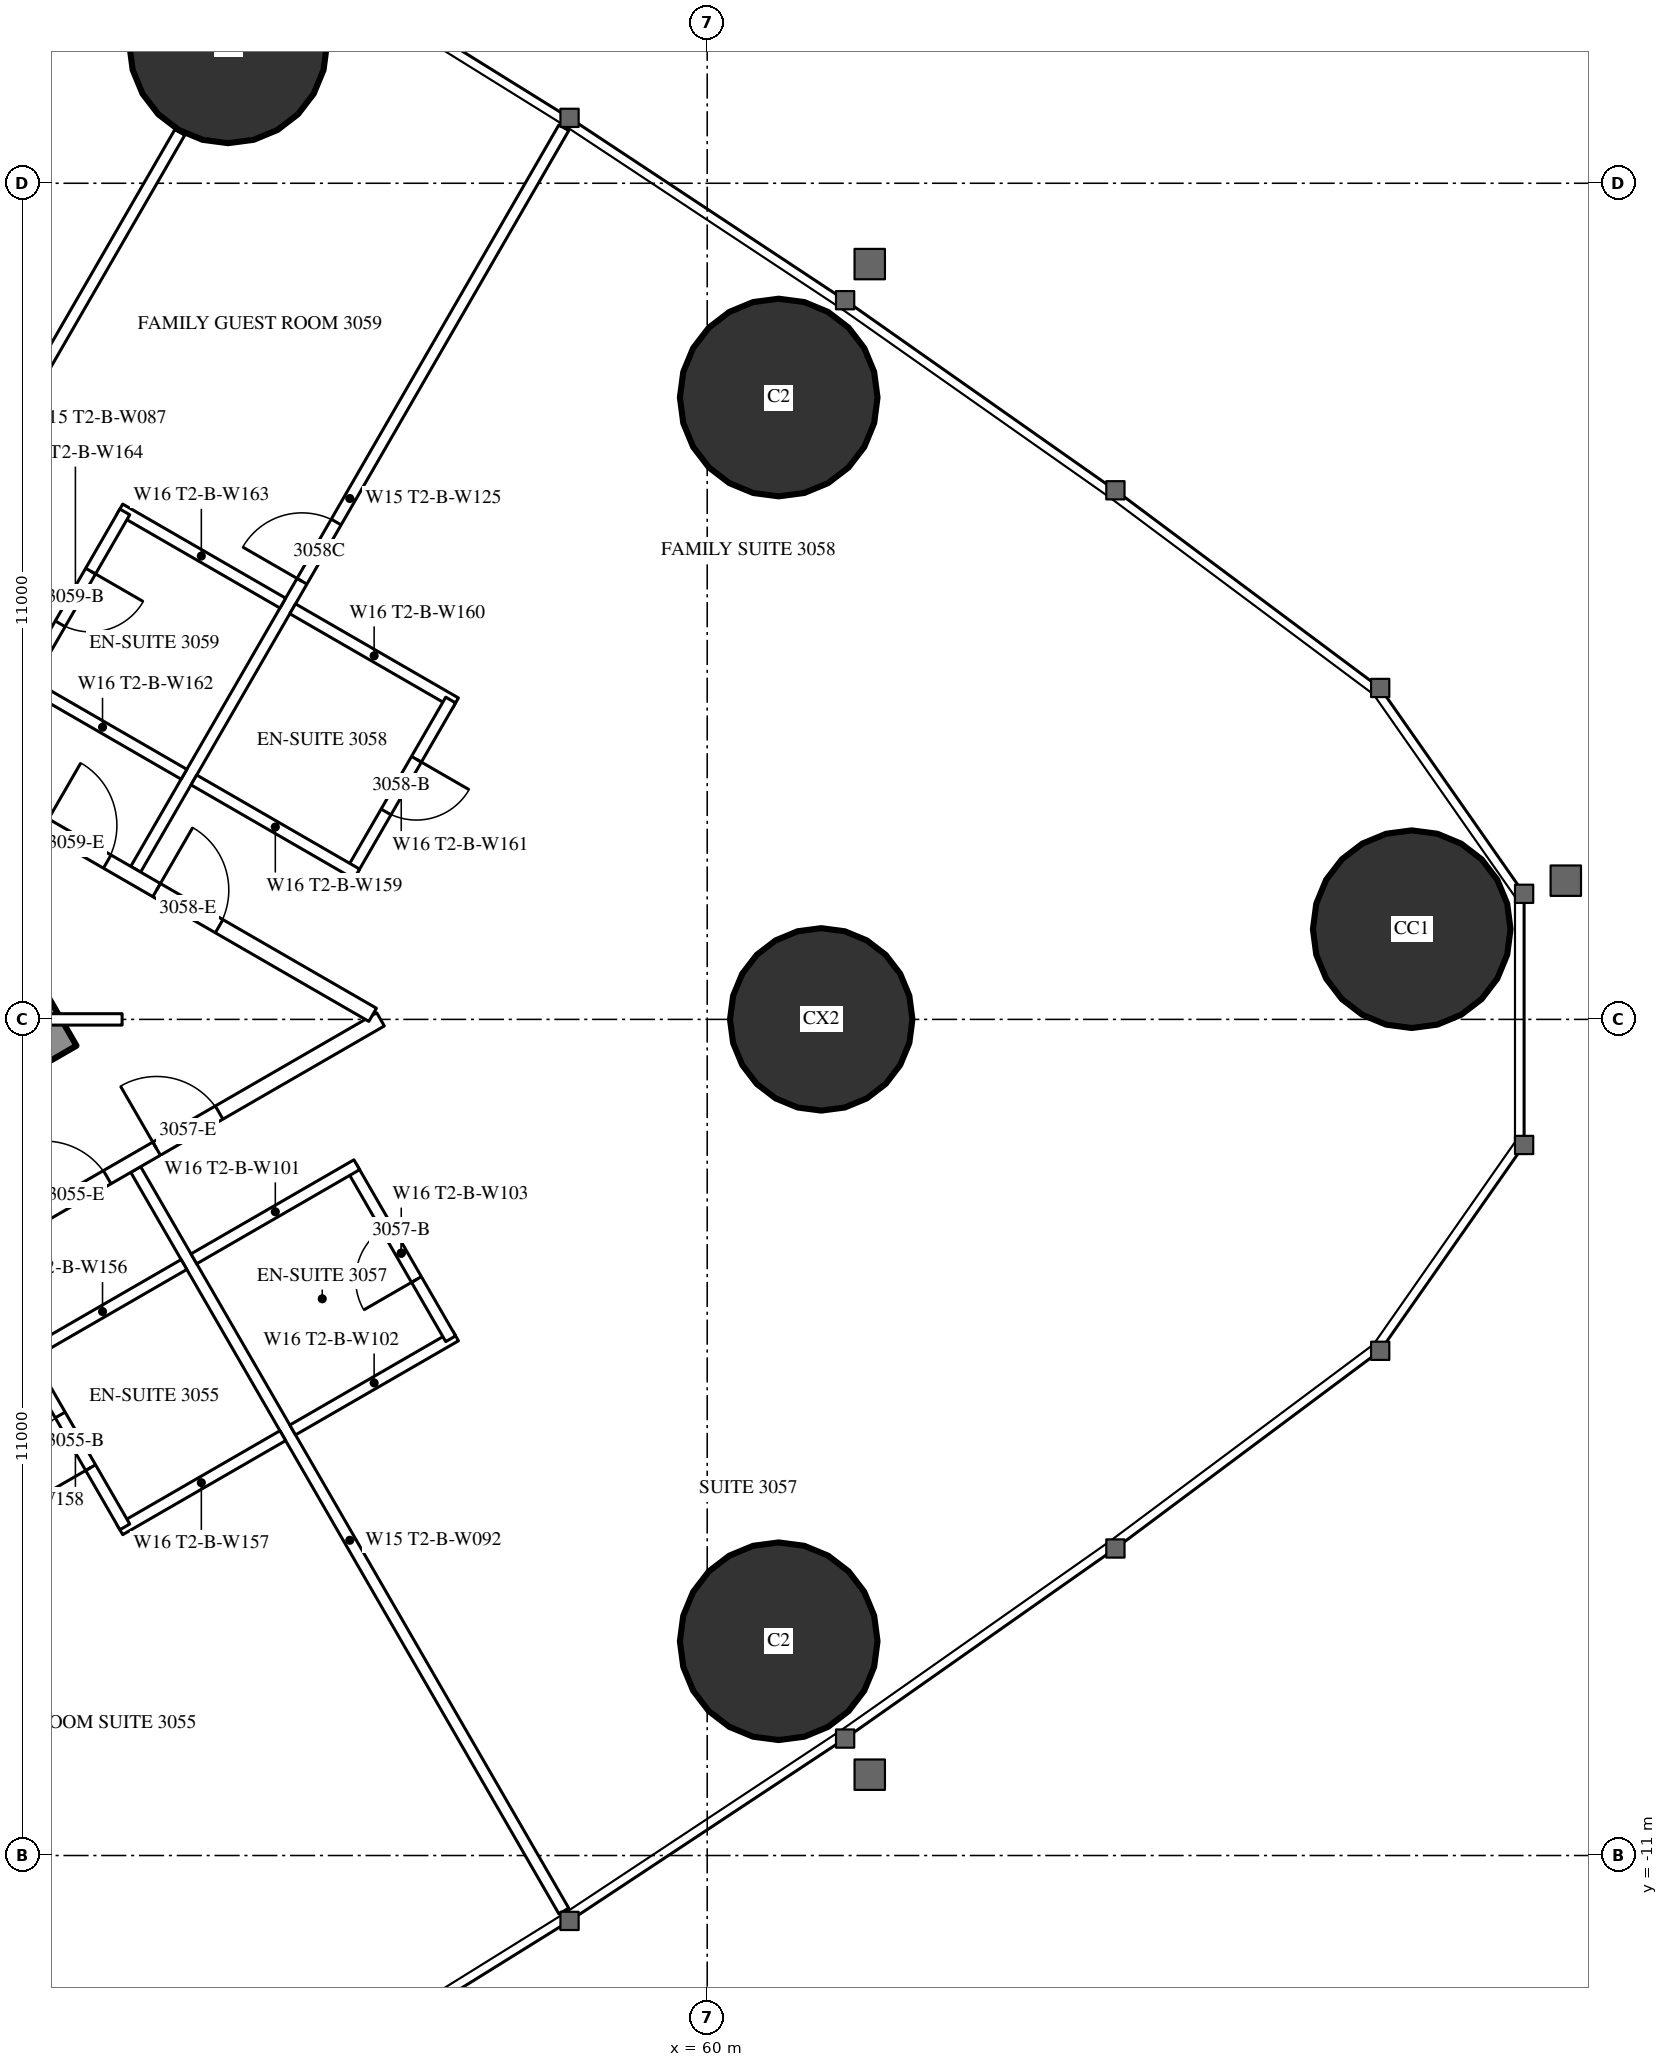
"""IFC4 building model, lengths in metres.
Left out: names, types, materials, properties, quantities, classifications, styles, units other than length and angle.
Written with IfcOpenShell. Run it as: python <this file> out.ifc"""

import sys

from ifc_helpers import new_model, si_unit, direction, frame, frame_2d, origin, origin_2d, place, context, subcontext, project, spatial, rectangle, circle, hollow_circle, extrude, element, fill, save


model = new_model("IFC4")
c1 = context("Model", 3, precision=1e-05, world=origin(), true_north=direction((0.0, 1.0)))
c2 = subcontext(c1, "Body", "Model", "MODEL_VIEW")
j1 = project(units=[si_unit("LENGTHUNIT", "METRE"), si_unit("PLANEANGLEUNIT", "RADIAN")], contexts=[c1])
p1 = place(None, origin())
s1 = spatial("IfcSite", under=j1, at=p1, CompositionType="ELEMENT")
p2 = place(p1, origin())
s2 = spatial("IfcBuilding", under=s1, at=p2, CompositionType="ELEMENT")
p3 = place(p2, frame((0.0, 0.0, 115.1)))
s3 = spatial("IfcBuildingStorey", under=s2, at=p3, CompositionType="ELEMENT", Elevation=115.1)
for number, where, z_axis, x_axis in (
    (1, (69.269, 1.187, 0.0), (0.0, 0.0, 1.0), (1.0, 0.0, 0.0)),
    (2, (60.941, 8.181, 0.0), (0.0, 0.0, 1.0), (1.0, 0.0, 0.0)),
    (3, (53.697, 12.827, 0.0), (0.0, 0.0, 1.0), (1.0, 0.0, 0.0)),
    (4, (60.941, -8.181, 0.0), (0.0, 0.0, 1.0), (1.0, 0.0, 0.0)),
):
    element("IfcColumn", number, at=place(p3, frame(where, z_axis=z_axis, x_axis=x_axis)), inside=s3, PredefinedType="COLUMN", context=c2, shape_type="SweptSolid", body=[
        extrude(hollow_circle(Radius=1.3, WallThickness=0.1, at=origin_2d()), origin(), (0.0, 0.0, 1.0), 3.5),
    ])
p4 = place(p3, frame((61.5, 0.0, 0.0), z_axis=(0.0, 0.0, 1.0), x_axis=(1.0, 0.0, 0.0)))
e5 = element("IfcColumn", 5, at=p4, inside=s3, PredefinedType="COLUMN", context=c2, shape_type="SweptSolid", body=[
    extrude(circle(Radius=1.2, at=origin_2d()), origin(), (0.0, 0.0, 1.0), 3.5),
])
p5 = place(p3, frame((27.2, -13.8, 0.0), z_axis=(0.0, 0.0, 1.0), x_axis=(0.866027159892, 0.499996958321, 0.0)))
e6 = element("IfcWall", 6, at=p5, inside=s3, PredefinedType="SHEAR", context=c2, shape_type="SweptSolid", body=[
    extrude(rectangle(XDim=27.947, YDim=1.2, at=frame_2d((13.973, 0.0))), origin(), (0.0, 0.0, 1.0), 3.5),
])
p6 = place(p5, frame((4.6, 0.0, 0.0)))
e7 = element("IfcOpeningElement", 7, at=p6, cuts=e6, PredefinedType="OPENING", context=c2, shape_type="SweptSolid", body=[
    extrude(rectangle(XDim=1.0, YDim=2.2, at=frame_2d((0.5, 1.1))), frame((0.0, 0.61, 0.0), z_axis=(0.0, -1.0, 0.0), x_axis=(1.0, 0.0, 0.0)), (0.0, 0.0, 1.0), 1.22),
])
p7 = place(p5, frame((13.395, 0.0, 0.0)))
e8 = element("IfcOpeningElement", 8, at=p7, cuts=e6, PredefinedType="OPENING", context=c2, shape_type="SweptSolid", body=[
    extrude(rectangle(XDim=1.8, YDim=2.2, at=frame_2d((0.9, 1.1))), frame((0.0, 0.61, 0.0), z_axis=(0.0, -1.0, 0.0), x_axis=(1.0, 0.0, 0.0)), (0.0, 0.0, 1.0), 1.22),
])
p8 = place(p3, frame((52.481, -1.975, 0.0), z_axis=(0.0, 0.0, 1.0), x_axis=(0.500003867771, -0.866023170714, 0.0)))
e9 = element("IfcWall", 9, at=p8, inside=s3, PredefinedType="PARTITIONING", context=c2, shape_type="SweptSolid", body=[
    extrude(rectangle(XDim=11.265, YDim=0.15, at=frame_2d((5.632, 0.0))), origin(), (0.0, 0.0, 1.0), 3.25),
])
p9 = place(p3, frame((48.719, 4.147, 0.0), z_axis=(0.0, 0.0, 1.0), x_axis=(0.499993328235, 0.866029255696, 0.0)))
e10 = element("IfcWall", 10, at=p9, inside=s3, PredefinedType="PARTITIONING", context=c2, shape_type="SweptSolid", body=[
    extrude(rectangle(XDim=8.686, YDim=0.15, at=frame_2d((4.343, 0.0))), origin(), (0.0, 0.0, 1.0), 2.2),
])
p10 = place(p3, frame((52.481, 1.975, 0.0), z_axis=(0.0, 0.0, 1.0), x_axis=(0.500003867771, 0.866023170714, 0.0)))
e11 = element("IfcWall", 11, at=p10, inside=s3, PredefinedType="PARTITIONING", context=c2, shape_type="SweptSolid", body=[
    extrude(rectangle(XDim=11.265, YDim=0.15, at=frame_2d((5.632, 0.0))), origin(), (0.0, 0.0, 1.0), 3.25),
])
p11 = place(p10, frame((4.375, 0.0, 0.0)))
e12 = element("IfcOpeningElement", 12, at=p11, cuts=e11, PredefinedType="OPENING", context=c2, shape_type="SweptSolid", body=[
    extrude(rectangle(XDim=0.9, YDim=2.2, at=frame_2d((0.45, 1.1))), frame((0.0, 0.085, 0.0), z_axis=(0.0, -1.0, 0.0), x_axis=(1.0, 0.0, 0.0)), (0.0, 0.0, 1.0), 0.17),
])
p12 = place(p3, frame((37.96, -10.243, 0.0), z_axis=(0.0, 0.0, 1.0), x_axis=(0.866026429433, 0.499998223521, 0.0)))
e13 = element("IfcWall", 13, at=p12, inside=s3, PredefinedType="PARTITIONING", context=c2, shape_type="SweptSolid", body=[
    extrude(rectangle(XDim=20.487, YDim=0.2, at=frame_2d((10.243, 0.0))), origin(), (0.0, 0.0, 1.0), 3.25),
])
p13 = place(p12, frame((4.343, 0.0, 0.0)))
e14 = element("IfcOpeningElement", 14, at=p13, cuts=e13, PredefinedType="OPENING", context=c2, shape_type="SweptSolid", body=[
    extrude(rectangle(XDim=0.95, YDim=2.2, at=frame_2d((0.475, 1.1))), frame((0.0, 0.11, 0.0), z_axis=(0.0, -1.0, 0.0), x_axis=(1.0, 0.0, 0.0)), (0.0, 0.0, 1.0), 0.22),
])
p14 = place(p12, frame((15.385, 0.0, 0.0)))
e15 = element("IfcOpeningElement", 15, at=p14, cuts=e13, PredefinedType="OPENING", context=c2, shape_type="SweptSolid", body=[
    extrude(rectangle(XDim=0.95, YDim=2.2, at=frame_2d((0.475, 1.1))), frame((0.0, 0.11, 0.0), z_axis=(0.0, -1.0, 0.0), x_axis=(1.0, 0.0, 0.0)), (0.0, 0.0, 1.0), 0.22),
])
p15 = place(p12, frame((17.085, 0.0, 0.0)))
e16 = element("IfcOpeningElement", 16, at=p15, cuts=e13, PredefinedType="OPENING", context=c2, shape_type="SweptSolid", body=[
    extrude(rectangle(XDim=0.95, YDim=2.2, at=frame_2d((0.475, 1.1))), frame((0.0, 0.11, 0.0), z_axis=(0.0, -1.0, 0.0), x_axis=(1.0, 0.0, 0.0)), (0.0, 0.0, 1.0), 0.22),
])
p16 = place(p12, frame((1.048, 0.0, 0.0)))
e17 = element("IfcOpeningElement", 17, at=p16, cuts=e13, PredefinedType="OPENING", context=c2, shape_type="SweptSolid", body=[
    extrude(rectangle(XDim=1.8, YDim=2.2, at=frame_2d((0.9, 1.1))), frame((0.0, 0.11, 0.0), z_axis=(0.0, -1.0, 0.0), x_axis=(1.0, 0.0, 0.0)), (0.0, 0.0, 1.0), 0.22),
])
p17 = place(p3, frame((44.925, 6.222, 0.0), z_axis=(0.0, 0.0, 1.0), x_axis=(0.866025590081, -0.499999677325, 0.0)))
e18 = element("IfcWall", 18, at=p17, inside=s3, PredefinedType="PARTITIONING", context=c2, shape_type="SweptSolid", body=[
    extrude(rectangle(XDim=12.324, YDim=0.2, at=frame_2d((6.162, 0.0))), origin(), (0.0, 0.0, 1.0), 3.25),
])
p18 = place(p17, frame((9.042, 0.0, 0.0)))
e19 = element("IfcOpeningElement", 19, at=p18, cuts=e18, PredefinedType="OPENING", context=c2, shape_type="SweptSolid", body=[
    extrude(rectangle(XDim=0.95, YDim=2.2, at=frame_2d((0.475, 1.1))), frame((0.0, 0.11, 0.0), z_axis=(0.0, -1.0, 0.0), x_axis=(1.0, 0.0, 0.0)), (0.0, 0.0, 1.0), 0.22),
])
p19 = place(p17, frame((7.342, 0.0, 0.0)))
e20 = element("IfcOpeningElement", 20, at=p19, cuts=e18, PredefinedType="OPENING", context=c2, shape_type="SweptSolid", body=[
    extrude(rectangle(XDim=0.95, YDim=2.2, at=frame_2d((0.475, 1.1))), frame((0.0, 0.11, 0.0), z_axis=(0.0, -1.0, 0.0), x_axis=(1.0, 0.0, 0.0)), (0.0, 0.0, 1.0), 0.22),
])
p20 = place(p17, frame((0.6, 0.0, 0.0)))
e21 = element("IfcOpeningElement", 21, at=p20, cuts=e18, PredefinedType="OPENING", context=c2, shape_type="SweptSolid", body=[
    extrude(rectangle(XDim=0.95, YDim=2.2, at=frame_2d((0.475, 1.1))), frame((0.0, 0.11, 0.0), z_axis=(0.0, -1.0, 0.0), x_axis=(1.0, 0.0, 0.0)), (0.0, 0.0, 1.0), 0.22),
])
p21 = place(p3, frame((52.273, -6.714, 0.0), z_axis=(0.0, 0.0, 1.0), x_axis=(0.866031185235, 0.4999899861, 0.0)))
e22 = element("IfcWall", 22, at=p21, inside=s3, PredefinedType="PARTITIONING", context=c2, shape_type="SweptSolid", body=[
    extrude(rectangle(XDim=2.475, YDim=0.15, at=frame_2d((1.238, 0.0))), origin(), (0.0, 0.0, 1.0), 3.25),
])
p22 = place(p3, frame((51.038, -4.425, 0.0), z_axis=(0.0, 0.0, 1.0), x_axis=(0.49997716683, -0.86603858612, 0.0)))
e23 = element("IfcWall", 23, at=p22, inside=s3, PredefinedType="PARTITIONING", context=c2, shape_type="SweptSolid", body=[
    extrude(rectangle(XDim=2.6, YDim=0.15, at=frame_2d((1.3, 0.0))), origin(), (0.0, 0.0, 1.0), 3.25),
])
p23 = place(p22, frame((0.9, 0.0, 0.0)))
e24 = element("IfcOpeningElement", 24, at=p23, cuts=e23, PredefinedType="OPENING", context=c2, shape_type="SweptSolid", body=[
    extrude(rectangle(XDim=0.8, YDim=2.2, at=frame_2d((0.4, 1.1))), frame((0.0, 0.085, 0.0), z_axis=(0.0, -1.0, 0.0), x_axis=(1.0, 0.0, 0.0)), (0.0, 0.0, 1.0), 0.17),
])
p24 = place(p3, frame((50.973, -4.462, 0.0), z_axis=(0.0, 0.0, 1.0), x_axis=(0.866031185235, 0.4999899861, 0.0)))
e25 = element("IfcWall", 25, at=p24, inside=s3, PredefinedType="PARTITIONING", context=c2, shape_type="SweptSolid", body=[
    extrude(rectangle(XDim=2.475, YDim=0.15, at=frame_2d((1.238, 0.0))), origin(), (0.0, 0.0, 1.0), 3.25),
])
p25 = place(p3, frame((54.546, -5.402, 0.0), z_axis=(0.0, 0.0, 1.0), x_axis=(0.866006523861, 0.500032699561, 0.0)))
e26 = element("IfcWall", 26, at=p25, inside=s3, PredefinedType="PARTITIONING", context=c2, shape_type="SweptSolid", body=[
    extrude(rectangle(XDim=2.475, YDim=0.15, at=frame_2d((1.237, 0.0))), origin(), (0.0, 0.0, 1.0), 3.25),
])
p26 = place(p3, frame((55.325, -1.95, 0.0), z_axis=(0.0, 0.0, 1.0), x_axis=(0.500006934395, -0.866021400173, 0.0)))
e27 = element("IfcWall", 27, at=p26, inside=s3, PredefinedType="PARTITIONING", context=c2, shape_type="SweptSolid", body=[
    extrude(rectangle(XDim=2.6, YDim=0.15, at=frame_2d((1.3, 0.0))), origin(), (0.0, 0.0, 1.0), 3.25),
])
p27 = place(p26, frame((0.9, 0.0, 0.0)))
e28 = element("IfcOpeningElement", 28, at=p27, cuts=e27, PredefinedType="OPENING", context=c2, shape_type="SweptSolid", body=[
    extrude(rectangle(XDim=0.8, YDim=2.2, at=frame_2d((0.4, 1.1))), frame((0.0, 0.085, 0.0), z_axis=(0.0, -1.0, 0.0), x_axis=(1.0, 0.0, 0.0)), (0.0, 0.0, 1.0), 0.17),
])
for number, where, z_axis, x_axis in (
    (29, (53.246, -3.15, 0.0), (0.0, 0.0, 1.0), (0.866, 0.5, 0.0)),
    (30, (54.546, 5.402, 0.0), (0.0, 0.0, 1.0), (0.866, -0.5, 0.0)),
):
    element("IfcWall", number, at=place(p3, frame(where, z_axis=z_axis, x_axis=x_axis)), inside=s3, PredefinedType="PARTITIONING", context=c2, shape_type="SweptSolid", body=[
        extrude(rectangle(XDim=2.475, YDim=0.15, at=frame_2d((1.237, 0.0))), origin(), (0.0, 0.0, 1.0), 3.25),
    ])
p28 = place(p3, frame((55.325, 1.95, 0.0), z_axis=(0.0, 0.0, 1.0), x_axis=(0.500006934395, 0.866021400173, 0.0)))
e31 = element("IfcWall", 31, at=p28, inside=s3, PredefinedType="PARTITIONING", context=c2, shape_type="SweptSolid", body=[
    extrude(rectangle(XDim=2.6, YDim=0.15, at=frame_2d((1.3, 0.0))), origin(), (0.0, 0.0, 1.0), 3.25),
])
p29 = place(p28, frame((0.9, 0.0, 0.0)))
e32 = element("IfcOpeningElement", 32, at=p29, cuts=e31, PredefinedType="OPENING", context=c2, shape_type="SweptSolid", body=[
    extrude(rectangle(XDim=0.8, YDim=2.2, at=frame_2d((0.4, 1.1))), frame((0.0, 0.085, 0.0), z_axis=(0.0, -1.0, 0.0), x_axis=(1.0, 0.0, 0.0)), (0.0, 0.0, 1.0), 0.17),
])
p30 = place(p3, frame((53.246, 3.15, 0.0), z_axis=(0.0, 0.0, 1.0), x_axis=(0.866006523861, -0.500032699561, 0.0)))
e33 = element("IfcWall", 33, at=p30, inside=s3, PredefinedType="PARTITIONING", context=c2, shape_type="SweptSolid", body=[
    extrude(rectangle(XDim=2.475, YDim=0.15, at=frame_2d((1.237, 0.0))), origin(), (0.0, 0.0, 1.0), 3.25),
])
p31 = place(p3, frame((52.273, 6.714, 0.0), z_axis=(0.0, 0.0, 1.0), x_axis=(0.866031185235, -0.4999899861, 0.0)))
e34 = element("IfcWall", 34, at=p31, inside=s3, PredefinedType="PARTITIONING", context=c2, shape_type="SweptSolid", body=[
    extrude(rectangle(XDim=2.475, YDim=0.15, at=frame_2d((1.238, 0.0))), origin(), (0.0, 0.0, 1.0), 3.25),
])
p32 = place(p3, frame((51.038, 4.425, 0.0), z_axis=(0.0, 0.0, 1.0), x_axis=(0.49997716683, 0.86603858612, 0.0)))
e35 = element("IfcWall", 35, at=p32, inside=s3, PredefinedType="PARTITIONING", context=c2, shape_type="SweptSolid", body=[
    extrude(rectangle(XDim=2.6, YDim=0.15, at=frame_2d((1.3, 0.0))), origin(), (0.0, 0.0, 1.0), 3.25),
])
p33 = place(p32, frame((0.9, 0.0, 0.0)))
e36 = element("IfcOpeningElement", 36, at=p33, cuts=e35, PredefinedType="OPENING", context=c2, shape_type="SweptSolid", body=[
    extrude(rectangle(XDim=0.8, YDim=2.2, at=frame_2d((0.4, 1.1))), frame((0.0, 0.085, 0.0), z_axis=(0.0, -1.0, 0.0), x_axis=(1.0, 0.0, 0.0)), (0.0, 0.0, 1.0), 0.17),
])
p34 = place(p3, frame((50.973, 4.462, 0.0), z_axis=(0.0, 0.0, 1.0), x_axis=(0.866031185235, -0.4999899861, 0.0)))
e37 = element("IfcWall", 37, at=p34, inside=s3, PredefinedType="PARTITIONING", context=c2, shape_type="SweptSolid", body=[
    extrude(rectangle(XDim=2.475, YDim=0.15, at=frame_2d((1.238, 0.0))), origin(), (0.0, 0.0, 1.0), 3.25),
])
p35 = place(p3, frame((44.575, 0.0, 0.0), z_axis=(0.0, 0.0, 1.0), x_axis=(1.0, 0.0, 0.0)))
e38 = element("IfcWall", 38, at=p35, inside=s3, PredefinedType="PARTITIONING", context=c2, shape_type="SweptSolid", body=[
    extrude(rectangle(XDim=7.727, YDim=0.15, at=frame_2d((3.864, 0.0))), origin(), (0.0, 0.0, 1.0), 2.2),
])
p36 = place(p23, origin())
e39 = element("IfcDoor", 39, at=p36, inside=s3, OperationType="SINGLE_SWING_RIGHT", PredefinedType="DOOR", context=c2, shape_type="SweptSolid", body=[
    extrude(rectangle(XDim=0.8, YDim=2.2, at=frame_2d((0.4, 1.1))), frame((0.0, 0.025, 0.0), z_axis=(0.0, -1.0, 0.0), x_axis=(1.0, 0.0, 0.0)), (0.0, 0.0, 1.0), 0.05),
])
fill(e24, e39)
p37 = place(p14, origin())
e40 = element("IfcDoor", 40, at=p37, inside=s3, OperationType="SINGLE_SWING_LEFT", PredefinedType="DOOR", context=c2, shape_type="SweptSolid", body=[
    extrude(rectangle(XDim=0.95, YDim=2.2, at=frame_2d((0.475, 1.1))), frame((0.0, 0.025, 0.0), z_axis=(0.0, -1.0, 0.0), x_axis=(1.0, 0.0, 0.0)), (0.0, 0.0, 1.0), 0.05),
])
fill(e15, e40)
p38 = place(p27, origin())
e41 = element("IfcDoor", 41, at=p38, inside=s3, OperationType="SINGLE_SWING_RIGHT", PredefinedType="DOOR", context=c2, shape_type="SweptSolid", body=[
    extrude(rectangle(XDim=0.8, YDim=2.2, at=frame_2d((0.4, 1.1))), frame((0.0, 0.025, 0.0), z_axis=(0.0, -1.0, 0.0), x_axis=(1.0, 0.0, 0.0)), (0.0, 0.0, 1.0), 0.05),
])
fill(e28, e41)
p39 = place(p15, origin())
e42 = element("IfcDoor", 42, at=p39, inside=s3, OperationType="SINGLE_SWING_LEFT", PredefinedType="DOOR", context=c2, shape_type="SweptSolid", body=[
    extrude(rectangle(XDim=0.95, YDim=2.2, at=frame_2d((0.475, 1.1))), frame((0.0, 0.025, 0.0), z_axis=(0.0, -1.0, 0.0), x_axis=(1.0, 0.0, 0.0)), (0.0, 0.0, 1.0), 0.05),
])
fill(e16, e42)
p40 = place(p29, origin())
e43 = element("IfcDoor", 43, at=p40, inside=s3, OperationType="SINGLE_SWING_RIGHT", PredefinedType="DOOR", context=c2, shape_type="SweptSolid", body=[
    extrude(rectangle(XDim=0.8, YDim=2.2, at=frame_2d((0.4, 1.1))), frame((0.0, 0.025, 0.0), z_axis=(0.0, -1.0, 0.0), x_axis=(1.0, 0.0, 0.0)), (0.0, 0.0, 1.0), 0.05),
])
fill(e32, e43)
p41 = place(p18, origin())
e44 = element("IfcDoor", 44, at=p41, inside=s3, OperationType="SINGLE_SWING_LEFT", PredefinedType="DOOR", context=c2, shape_type="SweptSolid", body=[
    extrude(rectangle(XDim=0.95, YDim=2.2, at=frame_2d((0.475, 1.1))), frame((0.0, 0.025, 0.0), z_axis=(0.0, -1.0, 0.0), x_axis=(1.0, 0.0, 0.0)), (0.0, 0.0, 1.0), 0.05),
])
fill(e19, e44)
p42 = place(p33, origin())
e45 = element("IfcDoor", 45, at=p42, inside=s3, OperationType="SINGLE_SWING_RIGHT", PredefinedType="DOOR", context=c2, shape_type="SweptSolid", body=[
    extrude(rectangle(XDim=0.8, YDim=2.2, at=frame_2d((0.4, 1.1))), frame((0.0, 0.025, 0.0), z_axis=(0.0, -1.0, 0.0), x_axis=(1.0, 0.0, 0.0)), (0.0, 0.0, 1.0), 0.05),
])
fill(e36, e45)
p43 = place(p19, origin())
e46 = element("IfcDoor", 46, at=p43, inside=s3, OperationType="SINGLE_SWING_LEFT", PredefinedType="DOOR", context=c2, shape_type="SweptSolid", body=[
    extrude(rectangle(XDim=0.95, YDim=2.2, at=frame_2d((0.475, 1.1))), frame((0.0, 0.025, 0.0), z_axis=(0.0, -1.0, 0.0), x_axis=(1.0, 0.0, 0.0)), (0.0, 0.0, 1.0), 0.05),
])
fill(e20, e46)
p44 = place(p11, origin())
e47 = element("IfcDoor", 47, at=p44, inside=s3, OperationType="SINGLE_SWING_LEFT", PredefinedType="DOOR", context=c2, shape_type="SweptSolid", body=[
    extrude(rectangle(XDim=0.9, YDim=2.2, at=frame_2d((0.45, 1.1))), frame((0.0, 0.025, 0.0), z_axis=(0.0, -1.0, 0.0), x_axis=(1.0, 0.0, 0.0)), (0.0, 0.0, 1.0), 0.05),
])
fill(e12, e47)
save(model, sys.argv[1])
